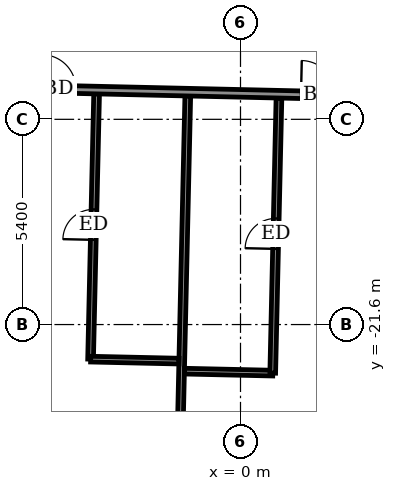
"""IFC4 building model, lengths in metres.
Left out: names, types, materials, properties, quantities, classifications, styles, units other than length and angle.
Written with IfcOpenShell. Run it as: python <this file> out.ifc"""

import sys

from ifc_helpers import new_model, si_unit, direction, frame, frame_2d, origin, place, context, subcontext, project, spatial, rectangle, extrude, element, fill, save


model = new_model("IFC4")
c1 = context("Model", 3, precision=1e-05, world=origin(), true_north=direction((0.0, 1.0)))
c2 = subcontext(c1, "Body", "Model", "MODEL_VIEW")
j1 = project(units=[si_unit("LENGTHUNIT", "METRE"), si_unit("PLANEANGLEUNIT", "RADIAN")], contexts=[c1])
p1 = place(None, origin())
s1 = spatial("IfcSite", under=j1, at=p1, CompositionType="ELEMENT")
p2 = place(p1, origin())
s2 = spatial("IfcBuilding", under=s1, at=p2, CompositionType="ELEMENT")
p3 = place(p2, frame((0.0, 0.0, 60.3)))
s3 = spatial("IfcBuildingStorey", under=s2, at=p3, CompositionType="ELEMENT", Elevation=60.3)
p4 = place(p3, frame((-1.661, -27.683, 0.0), z_axis=(0.0, 0.0, 1.0), x_axis=(0.022637991173, 0.99974372784, 0.0)))
e1 = element("IfcWall", 1, at=p4, inside=s3, PredefinedType="PARTITIONING", context=c2, shape_type="SweptSolid", body=[
    extrude(rectangle(XDim=12.1, YDim=0.15, at=frame_2d((6.05, 0.0))), origin(), (0.0, 0.0, 1.0), 2.55),
])
p5 = place(p3, frame((-1.474, -22.826, 0.0), z_axis=(0.0, 0.0, 1.0), x_axis=(0.999749797124, -0.022368351553, 0.0)))
e2 = element("IfcWall", 2, at=p5, inside=s3, PredefinedType="PARTITIONING", context=c2, shape_type="SweptSolid", body=[
    extrude(rectangle(XDim=2.325, YDim=0.15, at=frame_2d((1.162, 0.0))), origin(), (0.0, 0.0, 1.0), 3.05),
])
p6 = place(p3, frame((0.848, -22.878, 0.0), z_axis=(0.0, 0.0, 1.0), x_axis=(0.022660891034, 0.999743209038, 0.0)))
e3 = element("IfcWall", 3, at=p6, inside=s3, PredefinedType="PARTITIONING", context=c2, shape_type="SweptSolid", body=[
    extrude(rectangle(XDim=7.24, YDim=0.15, at=frame_2d((3.62, 0.0))), origin(), (0.0, 0.0, 1.0), 3.05),
])
p7 = place(p6, frame((3.27, 0.0, 0.0)))
e4 = element("IfcOpeningElement", 4, at=p7, cuts=e3, PredefinedType="OPENING", context=c2, shape_type="SweptSolid", body=[
    extrude(rectangle(XDim=0.8, YDim=2.1, at=frame_2d((0.4, 1.05))), frame((0.0, 0.085, 0.0), z_axis=(0.0, -1.0, 0.0), x_axis=(1.0, 0.0, 0.0)), (0.0, 0.0, 1.0), 0.17),
])
p8 = place(p3, frame((-3.945, -22.51, 0.0), z_axis=(0.0, 0.0, 1.0), x_axis=(0.022802437343, 0.999739990623, 0.0)))
e5 = element("IfcWall", 5, at=p8, inside=s3, PredefinedType="PARTITIONING", context=c2, shape_type="SweptSolid", body=[
    extrude(rectangle(XDim=6.981, YDim=0.15, at=frame_2d((3.49, 0.0))), origin(), (0.0, 0.0, 1.0), 3.05),
])
p9 = place(p8, frame((3.14, 0.0, 0.0)))
e6 = element("IfcOpeningElement", 6, at=p9, cuts=e5, PredefinedType="OPENING", context=c2, shape_type="SweptSolid", body=[
    extrude(rectangle(XDim=0.8, YDim=2.1, at=frame_2d((0.4, 1.05))), frame((0.0, 0.085, 0.0), z_axis=(0.0, -1.0, 0.0), x_axis=(1.0, 0.0, 0.0)), (0.0, 0.0, 1.0), 0.17),
])
p10 = place(p3, frame((-3.943, -22.51, 0.0), z_axis=(0.0, 0.0, 1.0), x_axis=(0.999750007167, -0.022358961731, 0.0)))
e7 = element("IfcWall", 7, at=p10, inside=s3, PredefinedType="PARTITIONING", context=c2, shape_type="SweptSolid", body=[
    extrude(rectangle(XDim=2.326, YDim=0.15, at=frame_2d((1.163, 0.0))), origin(), (0.0, 0.0, 1.0), 3.05),
])
p11 = place(p3, frame((-26.126, -14.924, 0.0), z_axis=(0.0, 0.0, 1.0), x_axis=(0.999742687583, -0.0226838847, 0.0)))
e8 = element("IfcWall", 8, at=p11, inside=s3, PredefinedType="PARTITIONING", context=c2, shape_type="SweptSolid", body=[
    extrude(rectangle(XDim=54.836, YDim=0.2, at=frame_2d((27.418, 0.0))), origin(), (0.0, 0.0, 1.0), 3.05),
])
p12 = place(p11, frame((0.775, 0.0, 0.0)))
e9 = element("IfcOpeningElement", 9, at=p12, cuts=e8, PredefinedType="OPENING", context=c2, shape_type="SweptSolid", body=[
    extrude(rectangle(XDim=1.0, YDim=2.1, at=frame_2d((0.5, 1.05))), frame((0.0, 0.11, 0.0), z_axis=(0.0, -1.0, 0.0), x_axis=(1.0, 0.0, 0.0)), (0.0, 0.0, 1.0), 0.22),
])
p13 = place(p11, frame((5.45, 0.0, 0.0)))
e10 = element("IfcOpeningElement", 10, at=p13, cuts=e8, PredefinedType="OPENING", context=c2, shape_type="SweptSolid", body=[
    extrude(rectangle(XDim=0.9, YDim=2.1, at=frame_2d((0.45, 1.05))), frame((0.0, 0.11, 0.0), z_axis=(0.0, -1.0, 0.0), x_axis=(1.0, 0.0, 0.0)), (0.0, 0.0, 1.0), 0.22),
])
p14 = place(p11, frame((10.0, 0.0, 0.0)))
e11 = element("IfcOpeningElement", 11, at=p14, cuts=e8, PredefinedType="OPENING", context=c2, shape_type="SweptSolid", body=[
    extrude(rectangle(XDim=0.9, YDim=2.1, at=frame_2d((0.45, 1.05))), frame((0.0, 0.11, 0.0), z_axis=(0.0, -1.0, 0.0), x_axis=(1.0, 0.0, 0.0)), (0.0, 0.0, 1.0), 0.22),
])
p15 = place(p11, frame((11.975, 0.0, 0.0)))
e12 = element("IfcOpeningElement", 12, at=p15, cuts=e8, PredefinedType="OPENING", context=c2, shape_type="SweptSolid", body=[
    extrude(rectangle(XDim=0.9, YDim=2.1, at=frame_2d((0.45, 1.05))), frame((0.0, 0.11, 0.0), z_axis=(0.0, -1.0, 0.0), x_axis=(1.0, 0.0, 0.0)), (0.0, 0.0, 1.0), 0.22),
])
p16 = place(p11, frame((18.85, 0.0, 0.0)))
e13 = element("IfcOpeningElement", 13, at=p16, cuts=e8, PredefinedType="OPENING", context=c2, shape_type="SweptSolid", body=[
    extrude(rectangle(XDim=0.9, YDim=2.1, at=frame_2d((0.45, 1.05))), frame((0.0, 0.11, 0.0), z_axis=(0.0, -1.0, 0.0), x_axis=(1.0, 0.0, 0.0)), (0.0, 0.0, 1.0), 0.22),
])
p17 = place(p11, frame((20.9, 0.0, 0.0)))
e14 = element("IfcOpeningElement", 14, at=p17, cuts=e8, PredefinedType="OPENING", context=c2, shape_type="SweptSolid", body=[
    extrude(rectangle(XDim=0.9, YDim=2.1, at=frame_2d((0.45, 1.05))), frame((0.0, 0.11, 0.0), z_axis=(0.0, -1.0, 0.0), x_axis=(1.0, 0.0, 0.0)), (0.0, 0.0, 1.0), 0.22),
])
p18 = place(p11, frame((27.725, 0.0, 0.0)))
e15 = element("IfcOpeningElement", 15, at=p18, cuts=e8, PredefinedType="OPENING", context=c2, shape_type="SweptSolid", body=[
    extrude(rectangle(XDim=0.9, YDim=2.1, at=frame_2d((0.45, 1.05))), frame((0.0, 0.11, 0.0), z_axis=(0.0, -1.0, 0.0), x_axis=(1.0, 0.0, 0.0)), (0.0, 0.0, 1.0), 0.22),
])
p19 = place(p11, frame((29.7, 0.0, 0.0)))
e16 = element("IfcOpeningElement", 16, at=p19, cuts=e8, PredefinedType="OPENING", context=c2, shape_type="SweptSolid", body=[
    extrude(rectangle(XDim=0.9, YDim=2.1, at=frame_2d((0.45, 1.05))), frame((0.0, 0.11, 0.0), z_axis=(0.0, -1.0, 0.0), x_axis=(1.0, 0.0, 0.0)), (0.0, 0.0, 1.0), 0.22),
])
p20 = place(p11, frame((36.5, 0.0, 0.0)))
e17 = element("IfcOpeningElement", 17, at=p20, cuts=e8, PredefinedType="OPENING", context=c2, shape_type="SweptSolid", body=[
    extrude(rectangle(XDim=0.9, YDim=2.1, at=frame_2d((0.45, 1.05))), frame((0.0, 0.11, 0.0), z_axis=(0.0, -1.0, 0.0), x_axis=(1.0, 0.0, 0.0)), (0.0, 0.0, 1.0), 0.22),
])
p21 = place(p11, frame((38.525, 0.0, 0.0)))
e18 = element("IfcOpeningElement", 18, at=p21, cuts=e8, PredefinedType="OPENING", context=c2, shape_type="SweptSolid", body=[
    extrude(rectangle(XDim=0.9, YDim=2.1, at=frame_2d((0.45, 1.05))), frame((0.0, 0.11, 0.0), z_axis=(0.0, -1.0, 0.0), x_axis=(1.0, 0.0, 0.0)), (0.0, 0.0, 1.0), 0.22),
])
p22 = place(p11, frame((45.325, 0.0, 0.0)))
e19 = element("IfcOpeningElement", 19, at=p22, cuts=e8, PredefinedType="OPENING", context=c2, shape_type="SweptSolid", body=[
    extrude(rectangle(XDim=0.9, YDim=2.1, at=frame_2d((0.45, 1.05))), frame((0.0, 0.11, 0.0), z_axis=(0.0, -1.0, 0.0), x_axis=(1.0, 0.0, 0.0)), (0.0, 0.0, 1.0), 0.22),
])
p23 = place(p11, frame((52.593, 0.0, 0.0)))
e20 = element("IfcOpeningElement", 20, at=p23, cuts=e8, PredefinedType="OPENING", context=c2, shape_type="SweptSolid", body=[
    extrude(rectangle(XDim=1.0, YDim=2.1, at=frame_2d((0.5, 1.05))), frame((0.0, 0.11, 0.0), z_axis=(0.0, -1.0, 0.0), x_axis=(1.0, 0.0, 0.0)), (0.0, 0.0, 1.0), 0.22),
])
p24 = place(p11, frame((47.55, 0.0, 0.0)))
e21 = element("IfcOpeningElement", 21, at=p24, cuts=e8, PredefinedType="OPENING", context=c2, shape_type="SweptSolid", body=[
    extrude(rectangle(XDim=0.9, YDim=2.1, at=frame_2d((0.45, 1.05))), frame((0.0, 0.11, 0.0), z_axis=(0.0, -1.0, 0.0), x_axis=(1.0, 0.0, 0.0)), (0.0, 0.0, 1.0), 0.22),
])
p25 = place(p17, origin())
e22 = element("IfcDoor", 22, at=p25, inside=s3, OperationType="SINGLE_SWING_RIGHT", PredefinedType="DOOR", context=c2, shape_type="SweptSolid", body=[
    extrude(rectangle(XDim=0.9, YDim=2.1, at=frame_2d((0.45, 1.05))), frame((0.0, 0.025, 0.0), z_axis=(0.0, -1.0, 0.0), x_axis=(1.0, 0.0, 0.0)), (0.0, 0.0, 1.0), 0.05),
])
fill(e14, e22)
p26 = place(p9, origin())
e23 = element("IfcDoor", 23, at=p26, inside=s3, OperationType="SINGLE_SWING_RIGHT", PredefinedType="DOOR", context=c2, shape_type="SweptSolid", body=[
    extrude(rectangle(XDim=0.8, YDim=2.1, at=frame_2d((0.4, 1.05))), frame((0.0, 0.025, 0.0), z_axis=(0.0, -1.0, 0.0), x_axis=(1.0, 0.0, 0.0)), (0.0, 0.0, 1.0), 0.05),
])
fill(e6, e23)
p27 = place(p18, origin())
e24 = element("IfcDoor", 24, at=p27, inside=s3, OperationType="SINGLE_SWING_LEFT", PredefinedType="DOOR", context=c2, shape_type="SweptSolid", body=[
    extrude(rectangle(XDim=0.9, YDim=2.1, at=frame_2d((0.45, 1.05))), frame((0.0, 0.025, 0.0), z_axis=(0.0, -1.0, 0.0), x_axis=(1.0, 0.0, 0.0)), (0.0, 0.0, 1.0), 0.05),
])
fill(e15, e24)
p28 = place(p7, origin())
e25 = element("IfcDoor", 25, at=p28, inside=s3, OperationType="SINGLE_SWING_LEFT", PredefinedType="DOOR", context=c2, shape_type="SweptSolid", body=[
    extrude(rectangle(XDim=0.8, YDim=2.1, at=frame_2d((0.4, 1.05))), frame((0.0, 0.025, 0.0), z_axis=(0.0, -1.0, 0.0), x_axis=(1.0, 0.0, 0.0)), (0.0, 0.0, 1.0), 0.05),
])
fill(e4, e25)
save(model, sys.argv[1])
